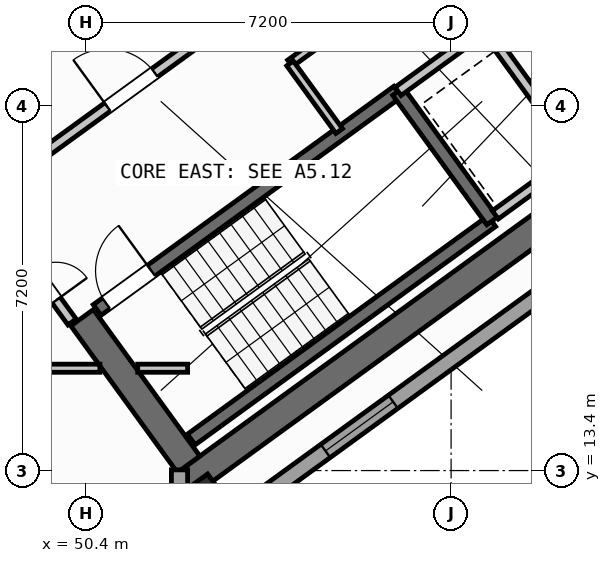
"""IFC4 building model, lengths in metres.
Left out: names, types, materials, properties, quantities, classifications, styles, units other than length and angle.
Written with IfcOpenShell. Run it as: python <this file> out.ifc"""

import sys

from ifc_helpers import new_model, si_unit, direction, frame, frame_2d, origin, origin_2d, place, context, subcontext, project, spatial, rectangle, hollow_rectangle, extrude, source, transform, mapped, element, fill, save


model = new_model("IFC4")
c1 = context("Model", 3, precision=1e-05, world=origin(), true_north=direction((0.0, 1.0)))
c2 = subcontext(c1, "Body", "Model", "MODEL_VIEW")
j1 = project(units=[si_unit("LENGTHUNIT", "METRE"), si_unit("PLANEANGLEUNIT", "RADIAN")], contexts=[c1])
p1 = place(None, origin())
s1 = spatial("IfcSite", under=j1, at=p1, CompositionType="ELEMENT")
p2 = place(p1, origin())
s2 = spatial("IfcBuilding", under=s1, at=p2, CompositionType="ELEMENT")
p3 = place(p2, frame((0.0, 0.0, 204.0)))
s3 = spatial("IfcBuildingStorey", under=s2, at=p3, CompositionType="ELEMENT", Elevation=204.0)
p4 = place(p3, frame((52.359, 13.14, 0.0), z_axis=(0.0, 0.0, 1.0), x_axis=(0.809014896919, 0.587788139183, 0.0)))
e1 = element("IfcWall", 1, at=p4, inside=s3, PredefinedType="SHEAR", context=c2, shape_type="SweptSolid", body=[
    extrude(rectangle(XDim=12.34, YDim=0.55, at=frame_2d((6.17, 0.0))), origin(), (0.0, 0.0, 1.0), 3.35),
])
p5 = place(p3, frame((52.42, 13.524, 0.0), z_axis=(0.0, 0.0, 1.0), x_axis=(-0.587802113096, 0.809004744015, 0.0)))
e2 = element("IfcWall", 2, at=p5, inside=s3, PredefinedType="SHEAR", context=c2, shape_type="SweptSolid", body=[
    extrude(rectangle(XDim=3.575, YDim=0.55, at=frame_2d((1.788, 0.0))), origin(), (0.0, 0.0, 1.0), 3.35),
])
m1 = source(origin(), c2, "Body", "SweptSolid", [
    extrude(hollow_rectangle(XDim=0.8, YDim=0.8, WallThickness=0.032, at=origin_2d()), origin(), (0.0, 0.0, 1.0), 3.6),
])
p6 = place(p3, frame((52.705, 12.773, 0.0), z_axis=(0.0, 0.0, 1.0), x_axis=(0.809016994375, 0.587785252292, 0.0)))
e3 = element("IfcColumn", 3, at=p6, inside=s3, PredefinedType="COLUMN", context=c2, shape_type="MappedRepresentation", body=[
    mapped(m1, transform((0.0, 0.0, 0.0), scale=1.0)),
])
p7 = place(p3, frame((67.454, 22.747, 0.0), z_axis=(0.0, 0.0, 1.0), x_axis=(-0.809021120468, -0.587779573171, 0.0)))
e4 = element("IfcWall", 4, at=p7, inside=s3, PredefinedType="STANDARD", context=c2, shape_type="SweptSolid", body=[
    extrude(rectangle(XDim=17.588, YDim=0.32, at=frame_2d((8.794, 0.0))), origin(), (0.0, 0.0, 1.0), 3.35),
])
p8 = place(p7, frame((1.624, 0.0, 0.0)))
e5 = element("IfcOpeningElement", 5, at=p8, cuts=e4, PredefinedType="OPENING", context=c2, shape_type="SweptSolid", body=[
    extrude(rectangle(XDim=1.05, YDim=2.15, at=frame_2d((0.525, 1.075))), frame((0.0, 0.17, 0.0), z_axis=(0.0, -1.0, 0.0), x_axis=(1.0, 0.0, 0.0)), (0.0, 0.0, 1.0), 0.34),
])
p9 = place(p7, frame((8.344, 0.0, 0.9)))
e6 = element("IfcOpeningElement", 6, at=p9, cuts=e4, PredefinedType="OPENING", context=c2, shape_type="SweptSolid", body=[
    extrude(rectangle(XDim=1.65, YDim=1.45, at=frame_2d((0.825, 0.725))), frame((0.0, 0.17, 0.0), z_axis=(0.0, -1.0, 0.0), x_axis=(1.0, 0.0, 0.0)), (0.0, 0.0, 1.0), 0.34),
])
p10 = place(p7, frame((13.594, 0.0, 0.9)))
e7 = element("IfcOpeningElement", 7, at=p10, cuts=e4, PredefinedType="OPENING", context=c2, shape_type="SweptSolid", body=[
    extrude(rectangle(XDim=1.65, YDim=1.45, at=frame_2d((0.825, 0.725))), frame((0.0, 0.17, 0.0), z_axis=(0.0, -1.0, 0.0), x_axis=(1.0, 0.0, 0.0)), (0.0, 0.0, 1.0), 0.34),
])
p11 = place(p3, frame((52.24, 13.414, 0.0), z_axis=(0.0, 0.0, 1.0), x_axis=(0.0, -1.0, 0.0)))
e8 = element("IfcWall", 8, at=p11, inside=s3, PredefinedType="STANDARD", context=c2, shape_type="SweptSolid", body=[
    extrude(rectangle(XDim=9.948, YDim=0.32, at=frame_2d((4.974, 0.0))), origin(), (0.0, 0.0, 1.0), 3.35),
])
p12 = place(p11, frame((2.671, 0.0, 0.9)))
e9 = element("IfcOpeningElement", 9, at=p12, cuts=e8, PredefinedType="OPENING", context=c2, shape_type="SweptSolid", body=[
    extrude(rectangle(XDim=1.65, YDim=1.45, at=frame_2d((0.825, 0.725))), frame((0.0, 0.17, 0.0), z_axis=(0.0, -1.0, 0.0), x_axis=(1.0, 0.0, 0.0)), (0.0, 0.0, 1.0), 0.34),
])
p13 = place(p11, frame((7.408, 0.0, 0.9)))
e10 = element("IfcOpeningElement", 10, at=p13, cuts=e8, PredefinedType="OPENING", context=c2, shape_type="SweptSolid", body=[
    extrude(rectangle(XDim=1.35, YDim=1.45, at=frame_2d((0.675, 0.725))), frame((0.0, 0.17, 0.0), z_axis=(0.0, -1.0, 0.0), x_axis=(1.0, 0.0, 0.0)), (0.0, 0.0, 1.0), 0.34),
])
p14 = place(p3, frame((52.472, 14.013, 0.0), z_axis=(0.0, 0.0, 1.0), x_axis=(0.809028366311, 0.587769599847, 0.0)))
e11 = element("IfcWall", 11, at=p14, inside=s3, PredefinedType="SHEAR", context=c2, shape_type="SweptSolid", body=[
    extrude(rectangle(XDim=7.33, YDim=0.26, at=frame_2d((3.665, 0.0))), origin(), (0.0, 0.0, 1.0), 3.35),
])
p15 = place(p3, frame((50.615, 16.57, 0.0), z_axis=(0.0, 0.0, 1.0), x_axis=(0.809028366311, 0.587769599847, 0.0)))
e12 = element("IfcWall", 12, at=p15, inside=s3, PredefinedType="SHEAR", context=c2, shape_type="SweptSolid", body=[
    extrude(rectangle(XDim=7.33, YDim=0.26, at=frame_2d((3.665, 0.0))), origin(), (0.0, 0.0, 1.0), 3.35),
])
p16 = place(p15, frame((0.22, 0.0, 0.0)))
e13 = element("IfcOpeningElement", 13, at=p16, cuts=e12, PredefinedType="OPENING", context=c2, shape_type="SweptSolid", body=[
    extrude(rectangle(XDim=1.1, YDim=2.1, at=frame_2d((0.55, 1.05))), frame((0.0, 0.14, 0.0), z_axis=(0.0, -1.0, 0.0), x_axis=(1.0, 0.0, 0.0)), (0.0, 0.0, 1.0), 0.28),
])
p17 = place(p3, frame((58.41, 18.327, 0.0), z_axis=(0.0, 0.0, 1.0), x_axis=(-0.58776738483, 0.809029975545, 0.0)))
e14 = element("IfcWall", 14, at=p17, inside=s3, PredefinedType="SHEAR", context=c2, shape_type="SweptSolid", body=[
    extrude(rectangle(XDim=3.16, YDim=0.26, at=frame_2d((1.58, 0.0))), origin(), (0.0, 0.0, 1.0), 3.35),
])
p18 = place(p3, frame((47.065, 21.407, 0.0), z_axis=(0.0, 0.0, 1.0), x_axis=(0.809032984992, 0.587763242466, 0.0)))
e15 = element("IfcWall", 15, at=p18, inside=s3, PredefinedType="STANDARD", context=c2, shape_type="SweptSolid", body=[
    extrude(rectangle(XDim=3.448, YDim=0.2, at=frame_2d((1.724, 0.0))), origin(), (0.0, 0.0, 1.0), 3.34),
])
p19 = place(p18, frame((0.458, 0.0, 0.0)))
e16 = element("IfcOpeningElement", 16, at=p19, cuts=e15, PredefinedType="OPENING", context=c2, shape_type="SweptSolid", body=[
    extrude(rectangle(XDim=1.3, YDim=2.2, at=frame_2d((0.65, 1.1))), frame((0.0, 0.11, 0.0), z_axis=(0.0, -1.0, 0.0), x_axis=(1.0, 0.0, 0.0)), (0.0, 0.0, 1.0), 0.22),
])
p20 = place(p3, frame((48.758, 19.077, 0.0), z_axis=(0.0, 0.0, 1.0), x_axis=(0.809005065155, 0.587801671104, 0.0)))
e17 = element("IfcWall", 17, at=p20, inside=s3, PredefinedType="STANDARD", context=c2, shape_type="SweptSolid", body=[
    extrude(rectangle(XDim=5.768, YDim=0.2, at=frame_2d((2.884, 0.0))), origin(), (0.0, 0.0, 1.0), 3.34),
])
p21 = place(p20, frame((2.548, 0.0, 0.0)))
e18 = element("IfcOpeningElement", 18, at=p21, cuts=e17, PredefinedType="OPENING", context=c2, shape_type="SweptSolid", body=[
    extrude(rectangle(XDim=1.15, YDim=2.1, at=frame_2d((0.575, 1.05))), frame((0.0, 0.11, 0.0), z_axis=(0.0, -1.0, 0.0), x_axis=(1.0, 0.0, 0.0)), (0.0, 0.0, 1.0), 0.22),
])
p22 = place(p3, frame((56.553, 20.884, 0.0), z_axis=(0.0, 0.0, 1.0), x_axis=(0.809023564264, 0.58777620951, 0.0)))
e19 = element("IfcWall", 19, at=p22, inside=s3, PredefinedType="STANDARD", context=c2, shape_type="SweptSolid", body=[
    extrude(rectangle(XDim=3.818, YDim=0.2, at=frame_2d((1.909, 0.0))), origin(), (0.0, 0.0, 1.0), 3.34),
])
p23 = place(p22, frame((2.65, 0.0, 0.0)))
e20 = element("IfcOpeningElement", 20, at=p23, cuts=e19, PredefinedType="OPENING", context=c2, shape_type="SweptSolid", body=[
    extrude(rectangle(XDim=0.86, YDim=2.05, at=frame_2d((0.43, 1.025))), frame((0.0, 0.11, 0.0), z_axis=(0.0, -1.0, 0.0), x_axis=(1.0, 0.0, 0.0)), (0.0, 0.0, 1.0), 0.22),
])
p24 = place(p3, frame((54.421, 21.436, 0.0), z_axis=(0.0, 0.0, 1.0), x_axis=(0.809013710463, 0.587789772183, 0.0)))
e21 = element("IfcWall", 21, at=p24, inside=s3, PredefinedType="PARTITIONING", context=c2, shape_type="SweptSolid", body=[
    extrude(rectangle(XDim=5.36, YDim=0.16, at=frame_2d((2.68, 0.0))), origin(), (0.0, 0.0, 1.0), 3.34),
])
p25 = place(p24, frame((1.4, 0.0, 0.0)))
e22 = element("IfcOpeningElement", 22, at=p25, cuts=e21, PredefinedType="OPENING", context=c2, shape_type="SweptSolid", body=[
    extrude(rectangle(XDim=0.86, YDim=2.05, at=frame_2d((0.43, 1.025))), frame((0.0, 0.09, 0.0), z_axis=(0.0, -1.0, 0.0), x_axis=(1.0, 0.0, 0.0)), (0.0, 0.0, 1.0), 0.18),
])
p26 = place(p3, frame((55.391, 20.102, 0.0), z_axis=(0.0, 0.0, 1.0), x_axis=(-0.58778447739, 0.809017557374, 0.0)))
e23 = element("IfcWall", 23, at=p26, inside=s3, PredefinedType="PARTITIONING", context=c2, shape_type="SweptSolid", body=[
    extrude(rectangle(XDim=1.65, YDim=0.16, at=frame_2d((0.825, 0.0))), origin(), (0.0, 0.0, 1.0), 3.34),
])
p27 = place(p3, frame((60.067, 19.655, 0.0), z_axis=(0.0, 0.0, 1.0), x_axis=(-0.587800520745, 0.809005900975, 0.0)))
e24 = element("IfcWall", 24, at=p27, inside=s3, PredefinedType="STANDARD", context=c2, shape_type="SweptSolid", body=[
    extrude(rectangle(XDim=2.66, YDim=0.2, at=frame_2d((1.33, 0.0))), origin(), (0.0, 0.0, 1.0), 3.34),
])
p28 = place(p3, frame((58.472, 18.447, 0.0), z_axis=(0.0, 0.0, 1.0), x_axis=(0.809018631237, 0.587782999339, 0.0)))
e25 = element("IfcWall", 25, at=p28, inside=s3, PredefinedType="STANDARD", context=c2, shape_type="SweptSolid", body=[
    extrude(rectangle(XDim=3.698, YDim=0.2, at=frame_2d((1.849, 0.0))), origin(), (0.0, 0.0, 1.0), 3.34),
])
p29 = place(p3, frame((35.237, 15.42, 0.0), z_axis=(0.0, 0.0, 1.0), x_axis=(1.0, 0.0, 0.0)))
e26 = element("IfcWall", 26, at=p29, inside=s3, PredefinedType="PARTITIONING", context=c2, shape_type="SweptSolid", body=[
    extrude(rectangle(XDim=15.432, YDim=0.16, at=frame_2d((7.716, 0.0))), origin(), (0.0, 0.0, 1.0), 3.34),
])
p30 = place(p29, frame((0.674, 0.0, 0.0)))
e27 = element("IfcOpeningElement", 27, at=p30, cuts=e26, PredefinedType="OPENING", context=c2, shape_type="SweptSolid", body=[
    extrude(rectangle(XDim=1.0, YDim=2.1, at=frame_2d((0.5, 1.05))), frame((0.0, 0.09, 0.0), z_axis=(0.0, -1.0, 0.0), x_axis=(1.0, 0.0, 0.0)), (0.0, 0.0, 1.0), 0.18),
])
p31 = place(p29, frame((9.094, 0.0, 0.0)))
e28 = element("IfcOpeningElement", 28, at=p31, cuts=e26, PredefinedType="OPENING", context=c2, shape_type="SweptSolid", body=[
    extrude(rectangle(XDim=1.0, YDim=2.1, at=frame_2d((0.5, 1.05))), frame((0.0, 0.09, 0.0), z_axis=(0.0, -1.0, 0.0), x_axis=(1.0, 0.0, 0.0)), (0.0, 0.0, 1.0), 0.18),
])
p32 = place(p3, frame((51.416, 15.42, 0.0), z_axis=(0.0, 0.0, 1.0), x_axis=(1.0, 0.0, 0.0)))
e29 = element("IfcWall", 29, at=p32, inside=s3, PredefinedType="PARTITIONING", context=c2, shape_type="SweptSolid", body=[
    extrude(rectangle(XDim=0.984, YDim=0.16, at=frame_2d((0.492, 0.0))), origin(), (0.0, 0.0, 1.0), 3.34),
])
p33 = place(p3, frame((50.119, 16.333, 0.0), z_axis=(0.0, 0.0, 1.0), x_axis=(-0.587749856981, 0.809042709391, 0.0)))
e30 = element("IfcWall", 30, at=p33, inside=s3, PredefinedType="STANDARD", context=c2, shape_type="SweptSolid", body=[
    extrude(rectangle(XDim=2.96, YDim=0.2, at=frame_2d((1.48, 0.0))), origin(), (0.0, 0.0, 1.0), 3.34),
])
p34 = place(p33, frame((0.53, 0.0, 0.0)))
e31 = element("IfcOpeningElement", 31, at=p34, cuts=e30, PredefinedType="OPENING", context=c2, shape_type="SweptSolid", body=[
    extrude(rectangle(XDim=1.5, YDim=2.15, at=frame_2d((0.75, 1.075))), frame((0.0, 0.11, 0.0), z_axis=(0.0, -1.0, 0.0), x_axis=(1.0, 0.0, 0.0)), (0.0, 0.0, 1.0), 0.22),
])
m2 = source(origin(), c2, "Body", "SweptSolid", [
    extrude(rectangle(XDim=1.65, YDim=1.45, at=frame_2d((0.825, 0.725))), frame((0.0, 0.03, 0.0), z_axis=(0.0, -1.0, 0.0), x_axis=(1.0, 0.0, 0.0)), (0.0, 0.0, 1.0), 0.06),
])
p35 = place(p10, origin())
e32 = element("IfcWindow", 32, at=p35, inside=s3, PartitioningType="SINGLE_PANEL", PredefinedType="WINDOW", context=c2, shape_type="MappedRepresentation", body=[
    mapped(m2, transform((0.0, 0.0, 0.0), scale=1.0)),
])
fill(e7, e32)
m3 = source(origin(), c2, "Body", "SweptSolid", [
    extrude(rectangle(XDim=1.1, YDim=2.1, at=frame_2d((0.55, 1.05))), frame((0.0, 0.025, 0.0), z_axis=(0.0, -1.0, 0.0), x_axis=(1.0, 0.0, 0.0)), (0.0, 0.0, 1.0), 0.05),
])
p36 = place(p16, origin())
e33 = element("IfcDoor", 33, at=p36, inside=s3, OperationType="SINGLE_SWING_RIGHT", PredefinedType="DOOR", context=c2, shape_type="MappedRepresentation", body=[
    mapped(m3, transform((0.0, 0.0, 0.0), scale=1.0)),
])
fill(e13, e33)
m4 = source(origin(), c2, "Body", "SweptSolid", [
    extrude(rectangle(XDim=1.15, YDim=2.1, at=frame_2d((0.575, 1.05))), frame((0.0, 0.025, 0.0), z_axis=(0.0, -1.0, 0.0), x_axis=(1.0, 0.0, 0.0)), (0.0, 0.0, 1.0), 0.05),
])
p37 = place(p21, origin())
e34 = element("IfcDoor", 34, at=p37, inside=s3, OperationType="SINGLE_SWING_LEFT", PredefinedType="DOOR", context=c2, shape_type="MappedRepresentation", body=[
    mapped(m4, transform((0.0, 0.0, 0.0), scale=1.0)),
])
fill(e18, e34)
m5 = source(origin(), c2, "Body", "SweptSolid", [
    extrude(rectangle(XDim=1.5, YDim=2.15, at=frame_2d((0.75, 1.075))), frame((0.0, 0.025, 0.0), z_axis=(0.0, -1.0, 0.0), x_axis=(1.0, 0.0, 0.0)), (0.0, 0.0, 1.0), 0.05),
])
p38 = place(p34, frame((1.5, 0.0, 0.0), z_axis=(0.0, 0.0, 1.0), x_axis=(-1.0, 0.0, 0.0)))
e35 = element("IfcDoor", 35, at=p38, inside=s3, OperationType="DOUBLE_DOOR_SINGLE_SWING", PredefinedType="DOOR", context=c2, shape_type="MappedRepresentation", body=[
    mapped(m5, transform((0.0, 0.0, 0.0), scale=1.0)),
])
fill(e31, e35)
save(model, sys.argv[1])
